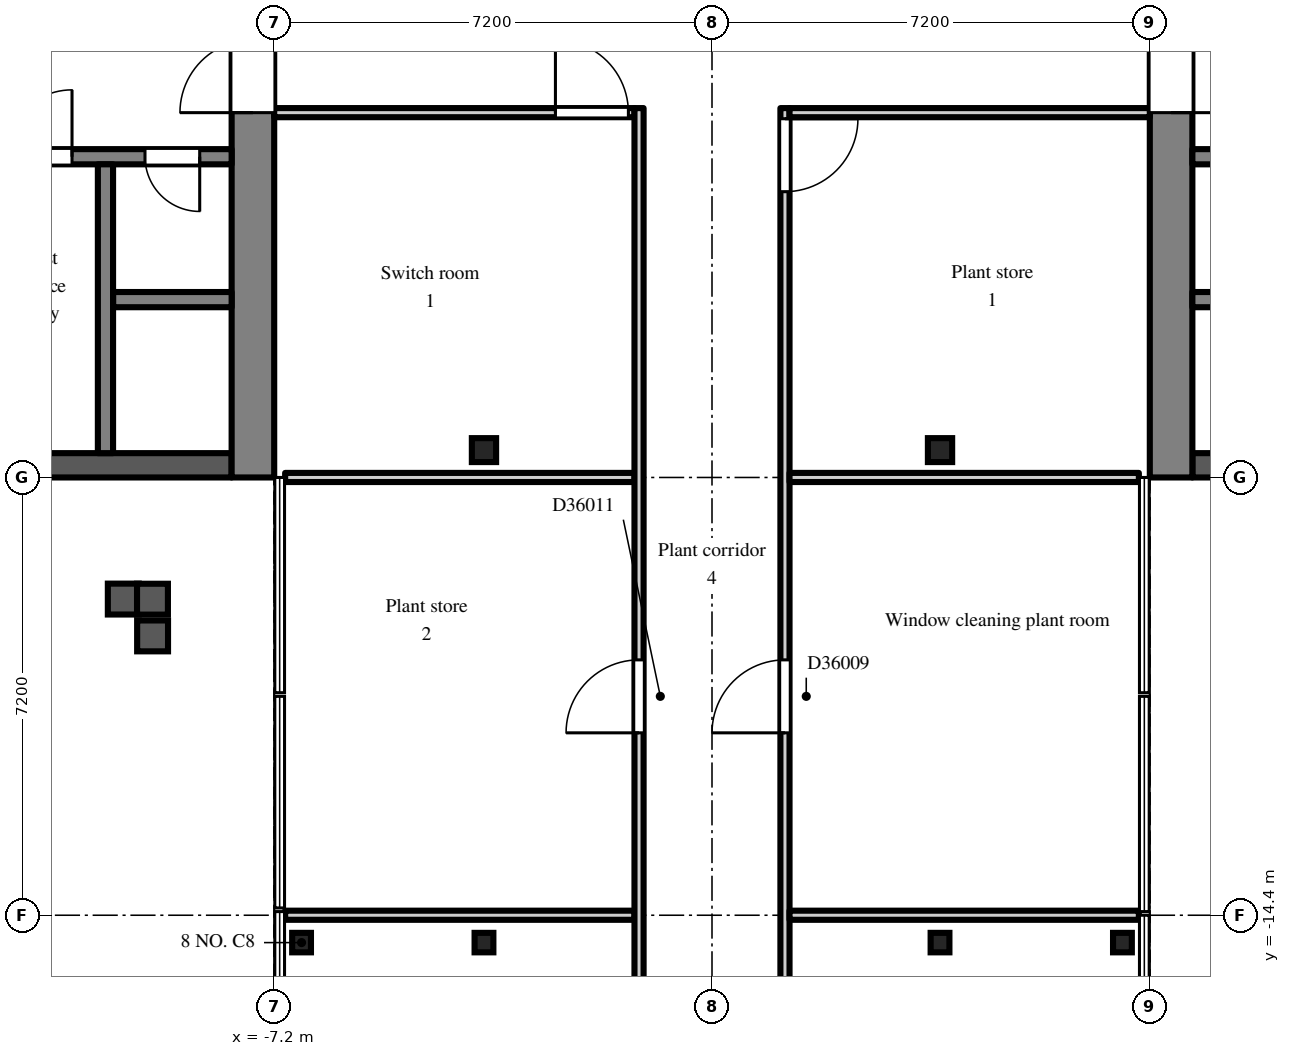
"""IFC4 building model, lengths in metres.
Left out: names, types, materials, properties, quantities, classifications, styles, units other than length and angle.
Written with IfcOpenShell. Run it as: python <this file> out.ifc"""

import sys

from ifc_helpers import new_model, si_unit, direction, frame, frame_2d, origin, origin_2d, place, context, subcontext, project, spatial, polyline, rectangle, i_section, outline, extrude, element, fill, save


model = new_model("IFC4")
c1 = context("Model", 3, precision=1e-05, world=origin(), true_north=direction((0.0, 1.0)))
c2 = subcontext(c1, "Body", "Model", "MODEL_VIEW")
j1 = project(units=[si_unit("LENGTHUNIT", "METRE"), si_unit("PLANEANGLEUNIT", "RADIAN")], contexts=[c1])
p1 = place(None, origin())
s1 = spatial("IfcSite", under=j1, at=p1, CompositionType="ELEMENT")
p2 = place(p1, origin())
s2 = spatial("IfcBuilding", under=s1, at=p2, CompositionType="ELEMENT")
p3 = place(p2, frame((0.0, 0.0, 247.5)))
s3 = spatial("IfcBuildingStorey", under=s2, at=p3, CompositionType="ELEMENT", Elevation=247.5)
p4 = place(p3, frame((-6.75, -14.85, 0.0), z_axis=(0.0, 0.0, 1.0), x_axis=(1.0, 0.0, 0.0)))
e1 = element("IfcColumn", 1, at=p4, inside=s3, PredefinedType="COLUMN", context=c2, shape_type="SweptSolid", body=[
    extrude(i_section(OverallWidth=0.309, OverallDepth=0.321, WebThickness=0.014, FlangeThickness=0.022, FilletRadius=0.015, at=origin_2d()), origin(), (0.0, 0.0, 1.0), 5.462),
])
p5 = place(p3, frame((-3.75, -14.85, 0.0), z_axis=(0.0, 0.0, 1.0), x_axis=(1.0, 0.0, 0.0)))
e2 = element("IfcColumn", 2, at=p5, inside=s3, PredefinedType="COLUMN", context=c2, shape_type="SweptSolid", body=[
    extrude(i_section(OverallWidth=0.309, OverallDepth=0.321, WebThickness=0.014, FlangeThickness=0.022, FilletRadius=0.015, at=origin_2d()), origin(), (0.0, 0.0, 1.0), 5.538),
])
p6 = place(p3, frame((-3.75, -6.75, 0.0), z_axis=(0.0, 0.0, 1.0), x_axis=(1.0, 0.0, 0.0)))
e3 = element("IfcColumn", 3, at=p6, inside=s3, PredefinedType="COLUMN", context=c2, shape_type="SweptSolid", body=[
    extrude(i_section(OverallWidth=0.399, OverallDepth=0.394, WebThickness=0.023, FlangeThickness=0.037, FilletRadius=0.015, at=origin_2d()), origin(), (0.0, 0.0, 1.0), 9.663),
])
p7 = place(p3, frame((3.75, -14.85, 0.0), z_axis=(0.0, 0.0, 1.0), x_axis=(1.0, 0.0, 0.0)))
e4 = element("IfcColumn", 4, at=p7, inside=s3, PredefinedType="COLUMN", context=c2, shape_type="SweptSolid", body=[
    extrude(i_section(OverallWidth=0.309, OverallDepth=0.321, WebThickness=0.014, FlangeThickness=0.022, FilletRadius=0.015, at=origin_2d()), origin(), (0.0, 0.0, 1.0), 5.538),
])
p8 = place(p3, frame((3.75, -6.75, 0.0), z_axis=(0.0, 0.0, 1.0), x_axis=(1.0, 0.0, 0.0)))
e5 = element("IfcColumn", 5, at=p8, inside=s3, PredefinedType="COLUMN", context=c2, shape_type="SweptSolid", body=[
    extrude(i_section(OverallWidth=0.399, OverallDepth=0.394, WebThickness=0.023, FlangeThickness=0.037, FilletRadius=0.015, at=origin_2d()), origin(), (0.0, 0.0, 1.0), 9.663),
])
p9 = place(p3, frame((6.75, -14.85, 0.0), z_axis=(0.0, 0.0, 1.0), x_axis=(1.0, 0.0, 0.0)))
e6 = element("IfcColumn", 6, at=p9, inside=s3, PredefinedType="COLUMN", context=c2, shape_type="SweptSolid", body=[
    extrude(i_section(OverallWidth=0.309, OverallDepth=0.321, WebThickness=0.014, FlangeThickness=0.022, FilletRadius=0.015, at=origin_2d()), origin(), (0.0, 0.0, 1.0), 5.462),
])
p10 = place(p3, frame((7.55, -7.2, 0.0), z_axis=(0.0, 0.0, 1.0), x_axis=(0.0, 1.0, 0.0)))
e7 = element("IfcWall", 7, at=p10, inside=s3, PredefinedType="SHEAR", context=c2, shape_type="SweptSolid", body=[
    extrude(outline(polyline([(0.0, 0.0), (14.4, 0.0), (14.4, 10.033), (7.2, 13.7), (0.0, 10.033), (0.0, 0.0)])), frame((0.0, 0.35, 0.0), z_axis=(0.0, -1.0, 0.0), x_axis=(1.0, 0.0, 0.0)), (0.0, 0.0, 1.0), 0.7),
])
p11 = place(p10, frame((6.0, 0.0, 0.0)))
e8 = element("IfcOpeningElement", 8, at=p11, cuts=e7, PredefinedType="OPENING", context=c2, shape_type="SweptSolid", body=[
    extrude(rectangle(XDim=2.4, YDim=2.2, at=frame_2d((1.2, 1.1))), frame((0.0, 0.36, 0.0), z_axis=(0.0, -1.0, 0.0), x_axis=(1.0, 0.0, 0.0)), (0.0, 0.0, 1.0), 0.72),
])
p12 = place(p3, frame((7.9, -7.0, 0.0), z_axis=(0.0, 0.0, 1.0), x_axis=(1.0, 0.0, 0.0)))
e9 = element("IfcWall", 9, at=p12, inside=s3, PredefinedType="SHEAR", context=c2, shape_type="SweptSolid", body=[
    extrude(rectangle(XDim=12.95, YDim=0.4, at=frame_2d((6.475, 0.0))), origin(), (0.0, 0.0, 1.0), 10.135),
])
p13 = place(p3, frame((7.9, -1.925, 0.0), z_axis=(0.0, 0.0, 1.0), x_axis=(1.0, 0.0, 0.0)))
e10 = element("IfcWall", 10, at=p13, inside=s3, PredefinedType="SHEAR", context=c2, shape_type="SweptSolid", body=[
    extrude(rectangle(XDim=12.95, YDim=0.25, at=frame_2d((6.475, 0.0))), origin(), (0.0, 0.0, 1.0), 12.72),
])
p14 = place(p13, frame((0.525, 0.0, 0.0)))
e11 = element("IfcOpeningElement", 11, at=p14, cuts=e10, PredefinedType="OPENING", context=c2, shape_type="SweptSolid", body=[
    extrude(rectangle(XDim=0.9, YDim=2.1, at=frame_2d((0.45, 1.05))), frame((0.0, 0.135, 0.0), z_axis=(0.0, -1.0, 0.0), x_axis=(1.0, 0.0, 0.0)), (0.0, 0.0, 1.0), 0.27),
])
p15 = place(p13, frame((2.625, 0.0, 0.0)))
e12 = element("IfcOpeningElement", 12, at=p15, cuts=e10, PredefinedType="OPENING", context=c2, shape_type="SweptSolid", body=[
    extrude(rectangle(XDim=1.1, YDim=2.1, at=frame_2d((0.55, 1.05))), frame((0.0, 0.135, 0.0), z_axis=(0.0, -1.0, 0.0), x_axis=(1.0, 0.0, 0.0)), (0.0, 0.0, 1.0), 0.27),
])
p16 = place(p13, frame((4.925, 0.0, 0.0)))
e13 = element("IfcOpeningElement", 13, at=p16, cuts=e10, PredefinedType="OPENING", context=c2, shape_type="SweptSolid", body=[
    extrude(rectangle(XDim=0.9, YDim=2.1, at=frame_2d((0.45, 1.05))), frame((0.0, 0.135, 0.0), z_axis=(0.0, -1.0, 0.0), x_axis=(1.0, 0.0, 0.0)), (0.0, 0.0, 1.0), 0.27),
])
p17 = place(p13, frame((8.225, 0.0, 0.0)))
e14 = element("IfcOpeningElement", 14, at=p17, cuts=e10, PredefinedType="OPENING", context=c2, shape_type="SweptSolid", body=[
    extrude(rectangle(XDim=0.9, YDim=2.1, at=frame_2d((0.45, 1.05))), frame((0.0, 0.135, 0.0), z_axis=(0.0, -1.0, 0.0), x_axis=(1.0, 0.0, 0.0)), (0.0, 0.0, 1.0), 0.27),
])
p18 = place(p13, frame((11.525, 0.0, 0.0)))
e15 = element("IfcOpeningElement", 15, at=p18, cuts=e10, PredefinedType="OPENING", context=c2, shape_type="SweptSolid", body=[
    extrude(rectangle(XDim=0.9, YDim=2.1, at=frame_2d((0.45, 1.05))), frame((0.0, 0.135, 0.0), z_axis=(0.0, -1.0, 0.0), x_axis=(1.0, 0.0, 0.0)), (0.0, 0.0, 1.0), 0.27),
])
p19 = place(p3, frame((7.9, -4.275, 0.0), z_axis=(0.0, 0.0, 1.0), x_axis=(1.0, 0.0, 0.0)))
e16 = element("IfcWall", 16, at=p19, inside=s3, PredefinedType="SHEAR", context=c2, shape_type="SweptSolid", body=[
    extrude(rectangle(XDim=1.95, YDim=0.25, at=frame_2d((0.975, 0.0))), origin(), (0.0, 0.0, 1.0), 11.523),
])
p20 = place(p3, frame((-7.55, -7.2, 0.0), z_axis=(0.0, 0.0, 1.0), x_axis=(0.0, 1.0, 0.0)))
e17 = element("IfcWall", 17, at=p20, inside=s3, PredefinedType="SHEAR", context=c2, shape_type="SweptSolid", body=[
    extrude(outline(polyline([(0.0, 0.0), (14.4, 0.0), (14.4, 10.033), (7.2, 13.7), (0.0, 10.033), (0.0, 0.0)])), frame((0.0, 0.35, 0.0), z_axis=(0.0, -1.0, 0.0), x_axis=(1.0, 0.0, 0.0)), (0.0, 0.0, 1.0), 0.7),
])
p21 = place(p20, frame((6.0, 0.0, 0.0)))
e18 = element("IfcOpeningElement", 18, at=p21, cuts=e17, PredefinedType="OPENING", context=c2, shape_type="SweptSolid", body=[
    extrude(rectangle(XDim=2.4, YDim=2.2, at=frame_2d((1.2, 1.1))), frame((0.0, 0.36, 0.0), z_axis=(0.0, -1.0, 0.0), x_axis=(1.0, 0.0, 0.0)), (0.0, 0.0, 1.0), 0.72),
])
p22 = place(p3, frame((-7.9, -7.0, 0.0), z_axis=(0.0, 0.0, 1.0), x_axis=(-1.0, 0.0, 0.0)))
e19 = element("IfcWall", 19, at=p22, inside=s3, PredefinedType="SHEAR", context=c2, shape_type="SweptSolid", body=[
    extrude(rectangle(XDim=12.95, YDim=0.4, at=frame_2d((6.475, 0.0))), origin(), (0.0, 0.0, 1.0), 10.135),
])
p23 = place(p3, frame((-7.9, -1.925, 0.0), z_axis=(0.0, 0.0, 1.0), x_axis=(-1.0, 0.0, 0.0)))
e20 = element("IfcWall", 20, at=p23, inside=s3, PredefinedType="SHEAR", context=c2, shape_type="SweptSolid", body=[
    extrude(rectangle(XDim=12.95, YDim=0.25, at=frame_2d((6.475, 0.0))), origin(), (0.0, 0.0, 1.0), 12.72),
])
p24 = place(p23, frame((0.525, 0.0, 0.0)))
e21 = element("IfcOpeningElement", 21, at=p24, cuts=e20, PredefinedType="OPENING", context=c2, shape_type="SweptSolid", body=[
    extrude(rectangle(XDim=0.9, YDim=2.1, at=frame_2d((0.45, 1.05))), frame((0.0, 0.135, 0.0), z_axis=(0.0, -1.0, 0.0), x_axis=(1.0, 0.0, 0.0)), (0.0, 0.0, 1.0), 0.27),
])
p25 = place(p23, frame((2.625, 0.0, 0.0)))
e22 = element("IfcOpeningElement", 22, at=p25, cuts=e20, PredefinedType="OPENING", context=c2, shape_type="SweptSolid", body=[
    extrude(rectangle(XDim=1.1, YDim=2.1, at=frame_2d((0.55, 1.05))), frame((0.0, 0.135, 0.0), z_axis=(0.0, -1.0, 0.0), x_axis=(1.0, 0.0, 0.0)), (0.0, 0.0, 1.0), 0.27),
])
p26 = place(p23, frame((4.925, 0.0, 0.0)))
e23 = element("IfcOpeningElement", 23, at=p26, cuts=e20, PredefinedType="OPENING", context=c2, shape_type="SweptSolid", body=[
    extrude(rectangle(XDim=0.9, YDim=2.1, at=frame_2d((0.45, 1.05))), frame((0.0, 0.135, 0.0), z_axis=(0.0, -1.0, 0.0), x_axis=(1.0, 0.0, 0.0)), (0.0, 0.0, 1.0), 0.27),
])
p27 = place(p23, frame((8.225, 0.0, 0.0)))
e24 = element("IfcOpeningElement", 24, at=p27, cuts=e20, PredefinedType="OPENING", context=c2, shape_type="SweptSolid", body=[
    extrude(rectangle(XDim=0.9, YDim=2.1, at=frame_2d((0.45, 1.05))), frame((0.0, 0.135, 0.0), z_axis=(0.0, -1.0, 0.0), x_axis=(1.0, 0.0, 0.0)), (0.0, 0.0, 1.0), 0.27),
])
p28 = place(p23, frame((11.525, 0.0, 0.0)))
e25 = element("IfcOpeningElement", 25, at=p28, cuts=e20, PredefinedType="OPENING", context=c2, shape_type="SweptSolid", body=[
    extrude(rectangle(XDim=0.9, YDim=2.1, at=frame_2d((0.45, 1.05))), frame((0.0, 0.135, 0.0), z_axis=(0.0, -1.0, 0.0), x_axis=(1.0, 0.0, 0.0)), (0.0, 0.0, 1.0), 0.27),
])
p29 = place(p3, frame((-7.9, -4.275, 0.0), z_axis=(0.0, 0.0, 1.0), x_axis=(-1.0, 0.0, 0.0)))
e26 = element("IfcWall", 26, at=p29, inside=s3, PredefinedType="SHEAR", context=c2, shape_type="SweptSolid", body=[
    extrude(rectangle(XDim=1.95, YDim=0.25, at=frame_2d((0.975, 0.0))), origin(), (0.0, 0.0, 1.0), 11.523),
])
p30 = place(p3, frame((-9.975, -2.05, 0.0), z_axis=(0.0, 0.0, 1.0), x_axis=(0.0, -1.0, 0.0)))
e27 = element("IfcWall", 27, at=p30, inside=s3, PredefinedType="SHEAR", context=c2, shape_type="SweptSolid", body=[
    extrude(outline(polyline([(0.0, 0.0), (4.75, 0.0), (4.75, 10.237), (0.0, 12.656), (0.0, 0.0)])), frame((0.0, 0.125, 0.0), z_axis=(0.0, -1.0, 0.0), x_axis=(1.0, 0.0, 0.0)), (0.0, 0.0, 1.0), 0.25),
])
p31 = place(p3, frame((-7.2, -1.2, 0.0), z_axis=(0.0, 0.0, 1.0), x_axis=(1.0, 0.0, 0.0)))
e28 = element("IfcWall", 28, at=p31, inside=s3, PredefinedType="PARTITIONING", context=c2, shape_type="SweptSolid", body=[
    extrude(rectangle(XDim=5.925, YDim=0.15, at=frame_2d((2.962, 0.0))), origin(), (0.0, 0.0, 1.0), 2.7),
])
p32 = place(p31, frame((4.625, 0.0, 0.0)))
e29 = element("IfcOpeningElement", 29, at=p32, cuts=e28, PredefinedType="OPENING", context=c2, shape_type="SweptSolid", body=[
    extrude(rectangle(XDim=1.2, YDim=2.1, at=frame_2d((0.6, 1.05))), frame((0.0, 0.085, 0.0), z_axis=(0.0, -1.0, 0.0), x_axis=(1.0, 0.0, 0.0)), (0.0, 0.0, 1.0), 0.17),
])
for number, where, z_axis, x_axis in (
    (30, (-7.02, -14.4, 0.0), (0.0, 0.0, 1.0), (1.0, 0.0, 0.0)),
    (31, (-7.02, -7.2, 0.0), (0.0, 0.0, 1.0), (1.0, 0.0, 0.0)),
):
    element("IfcWall", number, at=place(p3, frame(where, z_axis=z_axis, x_axis=x_axis)), inside=s3, PredefinedType="PARTITIONING", context=c2, shape_type="SweptSolid", body=[
        extrude(rectangle(XDim=5.745, YDim=0.15, at=frame_2d((2.873, 0.0))), origin(), (0.0, 0.0, 1.0), 2.7),
    ])
p33 = place(p3, frame((-1.2, -21.42, 0.0), z_axis=(0.0, 0.0, 1.0), x_axis=(0.0, 1.0, 0.0)))
e32 = element("IfcWall", 32, at=p33, inside=s3, PredefinedType="PARTITIONING", context=c2, shape_type="SweptSolid", body=[
    extrude(rectangle(XDim=20.295, YDim=0.15, at=frame_2d((10.147, 0.0))), origin(), (0.0, 0.0, 1.0), 2.7),
])
p34 = place(p33, frame((10.02, 0.0, 0.0)))
e33 = element("IfcOpeningElement", 33, at=p34, cuts=e32, PredefinedType="OPENING", context=c2, shape_type="SweptSolid", body=[
    extrude(rectangle(XDim=1.2, YDim=2.1, at=frame_2d((0.6, 1.05))), frame((0.0, 0.085, 0.0), z_axis=(0.0, -1.0, 0.0), x_axis=(1.0, 0.0, 0.0)), (0.0, 0.0, 1.0), 0.17),
])
p35 = place(p33, frame((2.97, 0.0, 0.0)))
e34 = element("IfcOpeningElement", 34, at=p35, cuts=e32, PredefinedType="OPENING", context=c2, shape_type="SweptSolid", body=[
    extrude(rectangle(XDim=1.2, YDim=2.1, at=frame_2d((0.6, 1.05))), frame((0.0, 0.085, 0.0), z_axis=(0.0, -1.0, 0.0), x_axis=(1.0, 0.0, 0.0)), (0.0, 0.0, 1.0), 0.17),
])
p36 = place(p3, frame((1.2, -21.42, 0.0), z_axis=(0.0, 0.0, 1.0), x_axis=(0.0, 1.0, 0.0)))
e35 = element("IfcWall", 35, at=p36, inside=s3, PredefinedType="PARTITIONING", context=c2, shape_type="SweptSolid", body=[
    extrude(rectangle(XDim=20.295, YDim=0.15, at=frame_2d((10.147, 0.0))), origin(), (0.0, 0.0, 1.0), 2.7),
])
p37 = place(p36, frame((18.92, 0.0, 0.0)))
e36 = element("IfcOpeningElement", 36, at=p37, cuts=e35, PredefinedType="OPENING", context=c2, shape_type="SweptSolid", body=[
    extrude(rectangle(XDim=1.2, YDim=2.1, at=frame_2d((0.6, 1.05))), frame((0.0, 0.085, 0.0), z_axis=(0.0, -1.0, 0.0), x_axis=(1.0, 0.0, 0.0)), (0.0, 0.0, 1.0), 0.17),
])
p38 = place(p36, frame((10.02, 0.0, 0.0)))
e37 = element("IfcOpeningElement", 37, at=p38, cuts=e35, PredefinedType="OPENING", context=c2, shape_type="SweptSolid", body=[
    extrude(rectangle(XDim=1.2, YDim=2.1, at=frame_2d((0.6, 1.05))), frame((0.0, 0.085, 0.0), z_axis=(0.0, -1.0, 0.0), x_axis=(1.0, 0.0, 0.0)), (0.0, 0.0, 1.0), 0.17),
])
p39 = place(p36, frame((2.97, 0.0, 0.0)))
e38 = element("IfcOpeningElement", 38, at=p39, cuts=e35, PredefinedType="OPENING", context=c2, shape_type="SweptSolid", body=[
    extrude(rectangle(XDim=1.2, YDim=2.1, at=frame_2d((0.6, 1.05))), frame((0.0, 0.085, 0.0), z_axis=(0.0, -1.0, 0.0), x_axis=(1.0, 0.0, 0.0)), (0.0, 0.0, 1.0), 0.17),
])
for number, where, z_axis, x_axis in (
    (39, (1.275, -14.4, 0.0), (0.0, 0.0, 1.0), (1.0, 0.0, 0.0)),
    (40, (1.275, -7.2, 0.0), (0.0, 0.0, 1.0), (1.0, 0.0, 0.0)),
):
    element("IfcWall", number, at=place(p3, frame(where, z_axis=z_axis, x_axis=x_axis)), inside=s3, PredefinedType="PARTITIONING", context=c2, shape_type="SweptSolid", body=[
        extrude(rectangle(XDim=5.745, YDim=0.15, at=frame_2d((2.873, 0.0))), origin(), (0.0, 0.0, 1.0), 2.7),
    ])
p40 = place(p3, frame((1.275, -1.2, 0.0), z_axis=(0.0, 0.0, 1.0), x_axis=(1.0, 0.0, 0.0)))
e41 = element("IfcWall", 41, at=p40, inside=s3, PredefinedType="PARTITIONING", context=c2, shape_type="SweptSolid", body=[
    extrude(rectangle(XDim=5.925, YDim=0.15, at=frame_2d((2.962, 0.0))), origin(), (0.0, 0.0, 1.0), 2.7),
])
p41 = place(p11, frame((2.4, 0.0, 0.0), z_axis=(0.0, 0.0, 1.0), x_axis=(-1.0, 0.0, 0.0)))
e42 = element("IfcDoor", 42, at=p41, inside=s3, OperationType="DOUBLE_DOOR_DOUBLE_SWING", PredefinedType="DOOR", context=c2, shape_type="SweptSolid", body=[
    extrude(rectangle(XDim=2.4, YDim=2.2, at=frame_2d((1.2, 1.1))), frame((0.0, 0.025, 0.0), z_axis=(0.0, -1.0, 0.0), x_axis=(1.0, 0.0, 0.0)), (0.0, 0.0, 1.0), 0.05),
])
fill(e8, e42)
p42 = place(p24, origin())
e43 = element("IfcDoor", 43, at=p42, inside=s3, OperationType="SINGLE_SWING_LEFT", PredefinedType="DOOR", context=c2, shape_type="SweptSolid", body=[
    extrude(rectangle(XDim=0.9, YDim=2.1, at=frame_2d((0.45, 1.05))), frame((0.0, 0.025, 0.0), z_axis=(0.0, -1.0, 0.0), x_axis=(1.0, 0.0, 0.0)), (0.0, 0.0, 1.0), 0.05),
])
fill(e21, e43)
p43 = place(p25, frame((1.1, 0.0, 0.0), z_axis=(0.0, 0.0, 1.0), x_axis=(-1.0, 0.0, 0.0)))
e44 = element("IfcDoor", 44, at=p43, inside=s3, OperationType="SINGLE_SWING_RIGHT", PredefinedType="DOOR", context=c2, shape_type="SweptSolid", body=[
    extrude(rectangle(XDim=1.1, YDim=2.1, at=frame_2d((0.55, 1.05))), frame((0.0, 0.025, 0.0), z_axis=(0.0, -1.0, 0.0), x_axis=(1.0, 0.0, 0.0)), (0.0, 0.0, 1.0), 0.05),
])
fill(e22, e44)
p44 = place(p21, origin())
e45 = element("IfcDoor", 45, at=p44, inside=s3, OperationType="DOUBLE_DOOR_DOUBLE_SWING", PredefinedType="DOOR", context=c2, shape_type="SweptSolid", body=[
    extrude(rectangle(XDim=2.4, YDim=2.2, at=frame_2d((1.2, 1.1))), frame((0.0, 0.025, 0.0), z_axis=(0.0, -1.0, 0.0), x_axis=(1.0, 0.0, 0.0)), (0.0, 0.0, 1.0), 0.05),
])
fill(e18, e45)
p45 = place(p32, origin())
e46 = element("IfcDoor", 46, at=p45, inside=s3, OperationType="SINGLE_SWING_LEFT", PredefinedType="DOOR", context=c2, shape_type="SweptSolid", body=[
    extrude(rectangle(XDim=1.2, YDim=2.1, at=frame_2d((0.6, 1.05))), frame((0.0, 0.025, 0.0), z_axis=(0.0, -1.0, 0.0), x_axis=(1.0, 0.0, 0.0)), (0.0, 0.0, 1.0), 0.05),
])
fill(e29, e46)
p46 = place(p37, frame((1.2, 0.0, 0.0), z_axis=(0.0, 0.0, 1.0), x_axis=(-1.0, 0.0, 0.0)))
e47 = element("IfcDoor", 47, at=p46, inside=s3, OperationType="SINGLE_SWING_LEFT", PredefinedType="DOOR", context=c2, shape_type="SweptSolid", body=[
    extrude(rectangle(XDim=1.2, YDim=2.1, at=frame_2d((0.6, 1.05))), frame((0.0, 0.025, 0.0), z_axis=(0.0, -1.0, 0.0), x_axis=(1.0, 0.0, 0.0)), (0.0, 0.0, 1.0), 0.05),
])
fill(e36, e47)
p47 = place(p38, origin())
e48 = element("IfcDoor", 48, at=p47, inside=s3, OperationType="SINGLE_SWING_LEFT", PredefinedType="DOOR", context=c2, shape_type="SweptSolid", body=[
    extrude(rectangle(XDim=1.2, YDim=2.1, at=frame_2d((0.6, 1.05))), frame((0.0, 0.025, 0.0), z_axis=(0.0, -1.0, 0.0), x_axis=(1.0, 0.0, 0.0)), (0.0, 0.0, 1.0), 0.05),
])
fill(e37, e48)
p48 = place(p34, origin())
e49 = element("IfcDoor", 49, at=p48, inside=s3, OperationType="SINGLE_SWING_LEFT", PredefinedType="DOOR", context=c2, shape_type="SweptSolid", body=[
    extrude(rectangle(XDim=1.2, YDim=2.1, at=frame_2d((0.6, 1.05))), frame((0.0, 0.025, 0.0), z_axis=(0.0, -1.0, 0.0), x_axis=(1.0, 0.0, 0.0)), (0.0, 0.0, 1.0), 0.05),
])
fill(e33, e49)
save(model, sys.argv[1])
